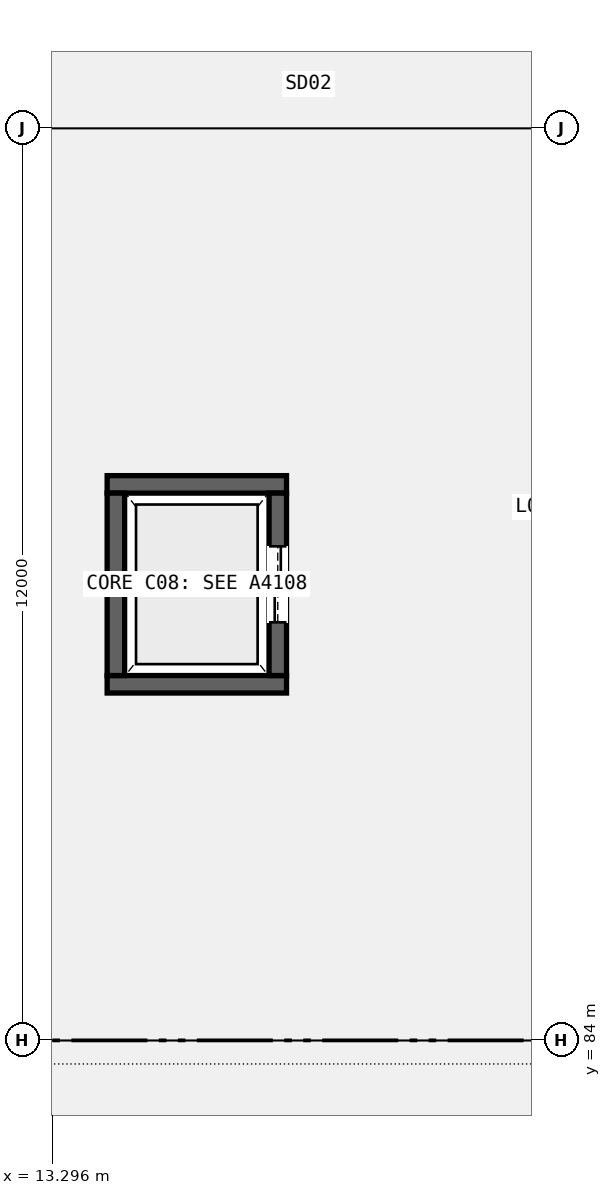
"""IFC4 building model, lengths in metres.
Left out: names, types, materials, properties, quantities, classifications, styles, units other than length and angle.
Written with IfcOpenShell. Run it as: python <this file> out.ifc"""

import sys

from ifc_helpers import new_model, si_unit, direction, frame, frame_2d, origin, place, context, subcontext, project, spatial, rectangle, extrude, element, fill, save


model = new_model("IFC4")
c1 = context("Model", 3, precision=1e-05, world=origin(), true_north=direction((0.0, 1.0)))
c2 = subcontext(c1, "Body", "Model", "MODEL_VIEW")
j1 = project(units=[si_unit("LENGTHUNIT", "METRE"), si_unit("PLANEANGLEUNIT", "RADIAN")], contexts=[c1])
p1 = place(None, origin())
s1 = spatial("IfcSite", under=j1, at=p1, CompositionType="ELEMENT")
p2 = place(p1, origin())
s2 = spatial("IfcBuilding", under=s1, at=p2, CompositionType="ELEMENT")
p3 = place(p2, frame((0.0, 0.0, 5.4)))
s3 = spatial("IfcBuildingStorey", under=s2, at=p3, CompositionType="ELEMENT", Elevation=5.4)
for number, where, z_axis, x_axis in (
    (1, (14.02, 88.685, 0.0), (0.0, 0.0, 1.0), (1.0, 0.0, 0.0)),
    (2, (14.02, 91.315, 0.0), (0.0, 0.0, 1.0), (1.0, 0.0, 0.0)),
):
    element("IfcWall", number, at=place(p3, frame(where, z_axis=z_axis, x_axis=x_axis)), inside=s3, PredefinedType="SHEAR", context=c2, shape_type="SweptSolid", body=[
        extrude(rectangle(XDim=2.36, YDim=0.23, at=frame_2d((1.18, 0.0))), origin(), (0.0, 0.0, 1.0), 4.55),
    ])
p4 = place(p3, frame((14.135, 88.8, 0.0), z_axis=(0.0, 0.0, 1.0), x_axis=(0.0, 1.0, 0.0)))
e3 = element("IfcWall", 3, at=p4, inside=s3, PredefinedType="SHEAR", context=c2, shape_type="SweptSolid", body=[
    extrude(rectangle(XDim=2.4, YDim=0.23, at=frame_2d((1.2, 0.0))), origin(), (0.0, 0.0, 1.0), 4.55),
])
p5 = place(p3, frame((16.265, 88.8, 0.0), z_axis=(0.0, 0.0, 1.0), x_axis=(0.0, 1.0, 0.0)))
e4 = element("IfcWall", 4, at=p5, inside=s3, PredefinedType="SHEAR", context=c2, shape_type="SweptSolid", body=[
    extrude(rectangle(XDim=2.4, YDim=0.23, at=frame_2d((1.2, 0.0))), origin(), (0.0, 0.0, 1.0), 4.55),
])
p6 = place(p5, frame((0.7, 0.0, 0.0)))
e5 = element("IfcOpeningElement", 5, at=p6, cuts=e4, PredefinedType="OPENING", context=c2, shape_type="SweptSolid", body=[
    extrude(rectangle(XDim=1.0, YDim=2.15, at=frame_2d((0.5, 1.075))), frame((0.0, 0.125, 0.0), z_axis=(0.0, -1.0, 0.0), x_axis=(1.0, 0.0, 0.0)), (0.0, 0.0, 1.0), 0.25),
])
p7 = place(p6, origin())
e6 = element("IfcDoor", 6, at=p7, inside=s3, OperationType="DOUBLE_DOOR_SLIDING", PredefinedType="DOOR", context=c2, shape_type="SweptSolid", body=[
    extrude(rectangle(XDim=1.0, YDim=2.15, at=frame_2d((0.5, 1.075))), frame((0.0, 0.025, 0.0), z_axis=(0.0, -1.0, 0.0), x_axis=(1.0, 0.0, 0.0)), (0.0, 0.0, 1.0), 0.05),
])
fill(e5, e6)
save(model, sys.argv[1])
